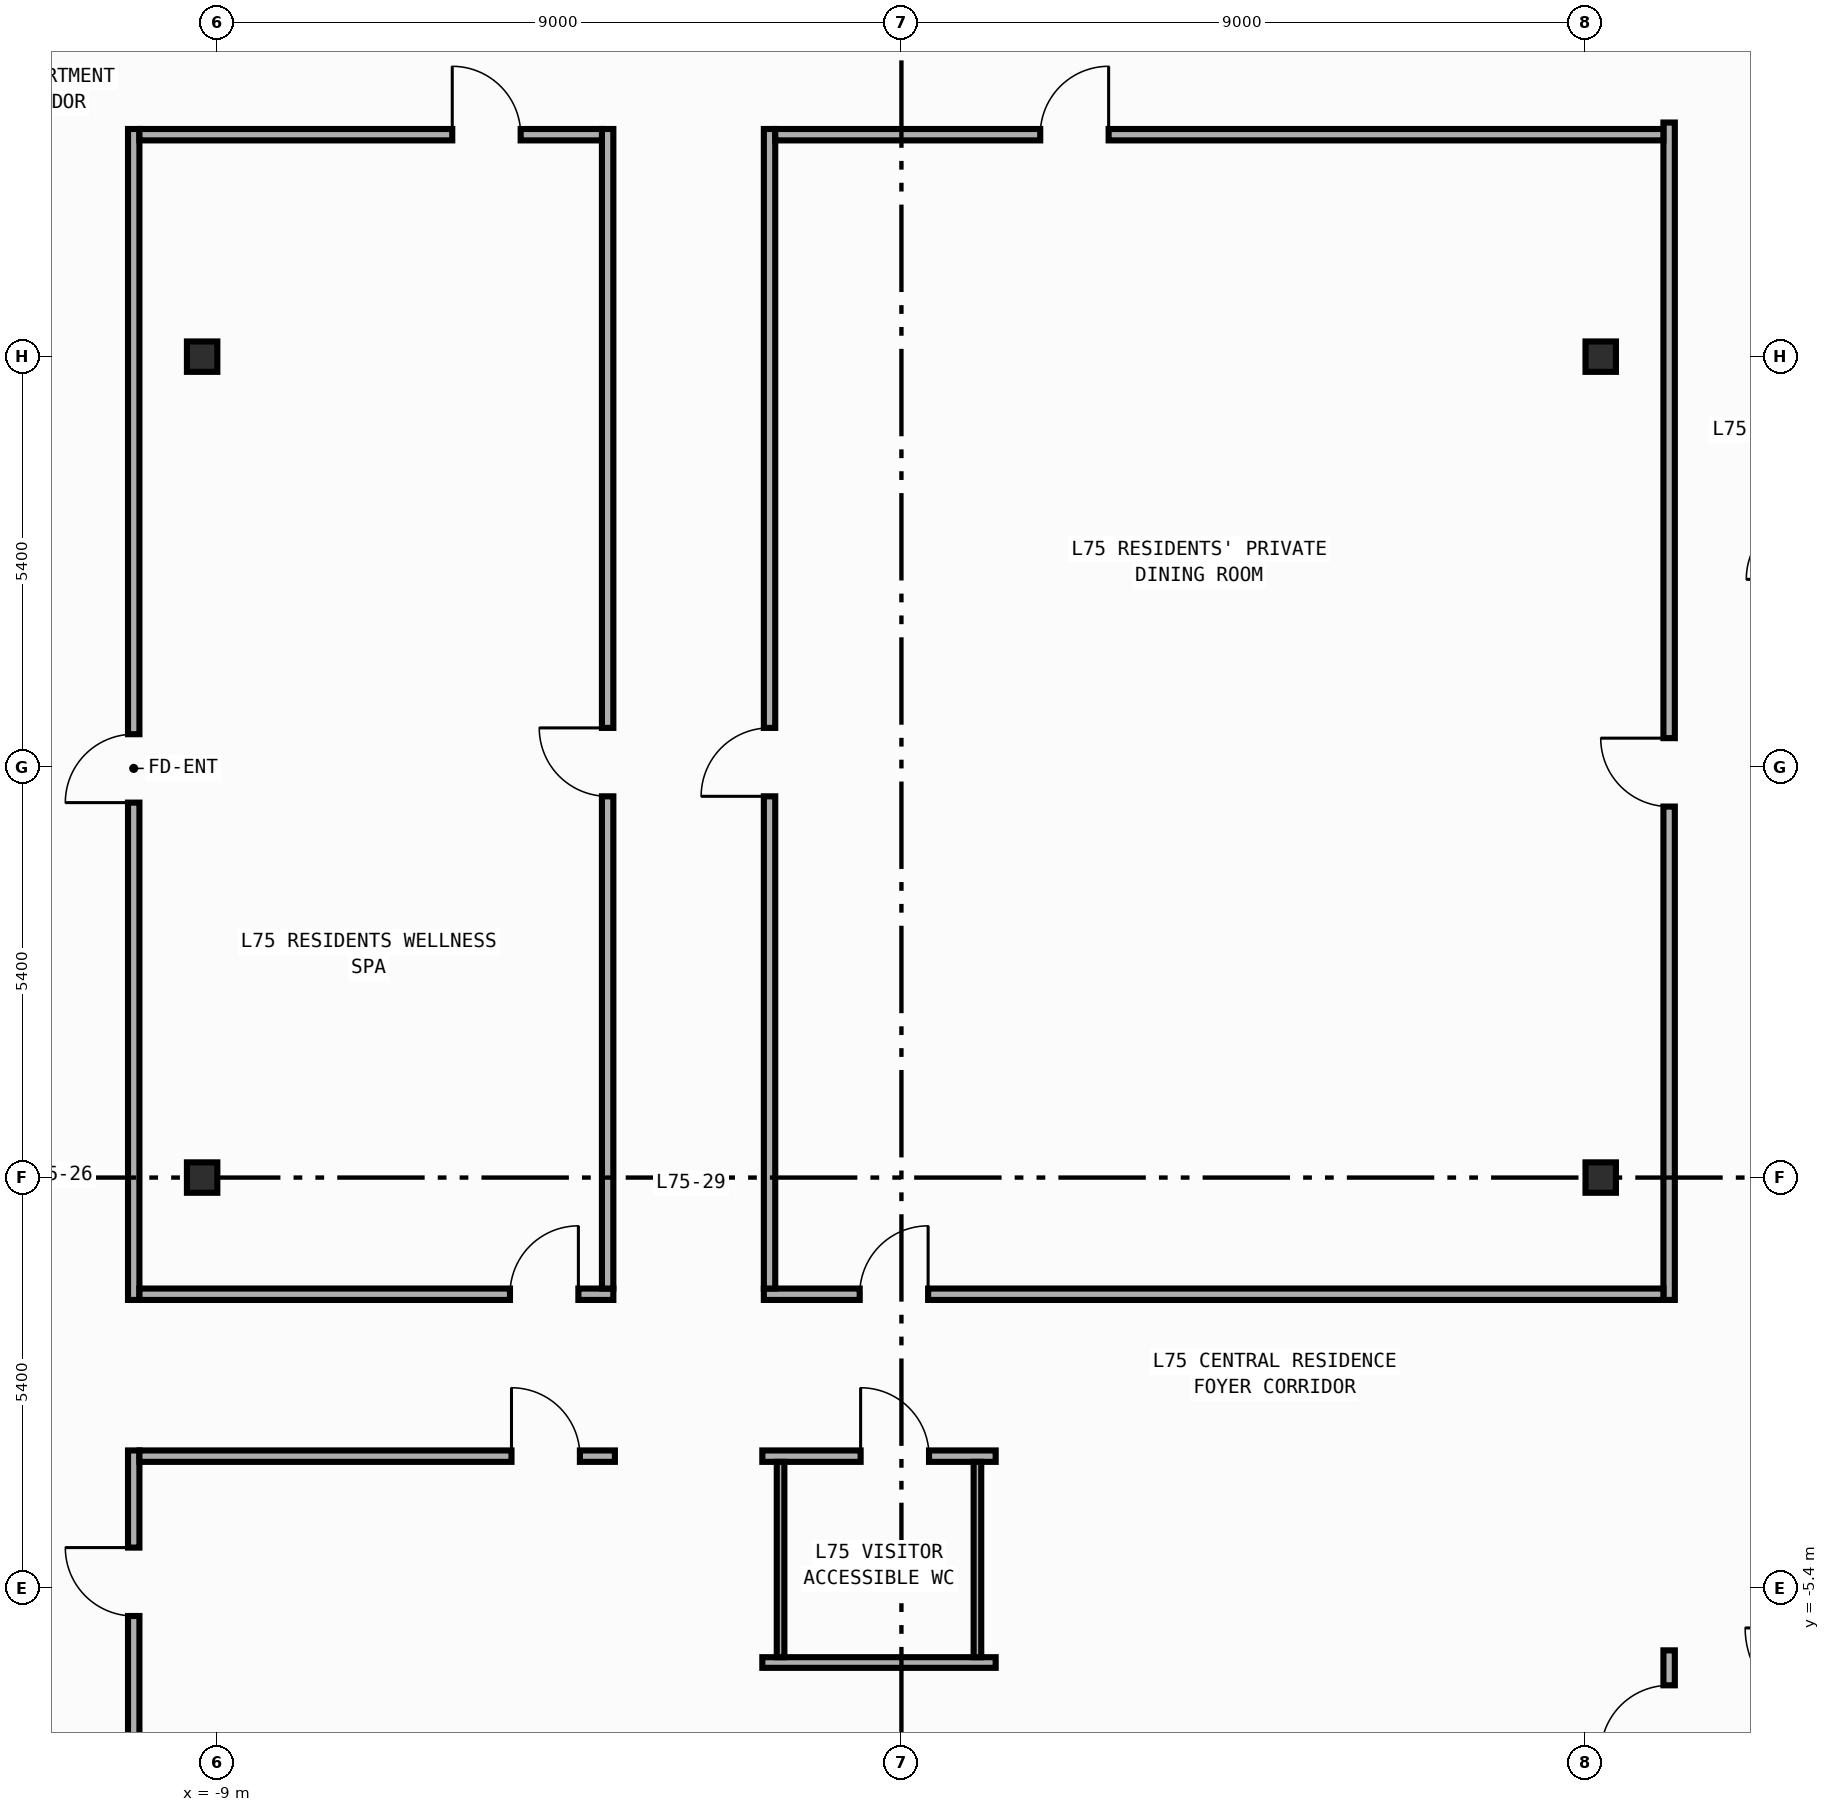
"""IFC4 building model, lengths in metres.
Left out: names, types, materials, properties, quantities, classifications, styles, units other than length and angle.
Written with IfcOpenShell. Run it as: python <this file> out.ifc"""

import sys

from ifc_helpers import new_model, si_unit, direction, frame, frame_2d, origin, origin_2d, place, context, subcontext, project, spatial, rectangle, i_section, extrude, element, fill, save


model = new_model("IFC4")
c1 = context("Model", 3, precision=1e-05, world=origin(), true_north=direction((0.0, 1.0)))
c2 = subcontext(c1, "Body", "Model", "MODEL_VIEW")
j1 = project(units=[si_unit("LENGTHUNIT", "METRE"), si_unit("PLANEANGLEUNIT", "RADIAN")], contexts=[c1])
p1 = place(None, origin())
s1 = spatial("IfcSite", under=j1, at=p1, CompositionType="ELEMENT")
p2 = place(p1, origin())
s2 = spatial("IfcBuilding", under=s1, at=p2, CompositionType="ELEMENT")
p3 = place(p2, frame((0.0, 0.0, 311.8)))
s3 = spatial("IfcBuildingStorey", under=s2, at=p3, CompositionType="ELEMENT", Elevation=311.8)
for number, where, z_axis, x_axis in (
    (1, (-9.2, 0.0, 0.0), (0.0, 0.0, 1.0), (1.0, 0.0, 0.0)),
    (2, (-9.2, 10.8, 0.0), (0.0, 0.0, 1.0), (1.0, 0.0, 0.0)),
    (3, (9.2, 0.0, 0.0), (0.0, 0.0, 1.0), (1.0, 0.0, 0.0)),
    (4, (9.2, 10.8, 0.0), (0.0, 0.0, 1.0), (1.0, 0.0, 0.0)),
):
    element("IfcColumn", number, at=place(p3, frame(where, z_axis=z_axis, x_axis=x_axis)), inside=s3, PredefinedType="COLUMN", context=c2, shape_type="SweptSolid", body=[
        extrude(i_section(OverallWidth=0.4, OverallDepth=0.4, WebThickness=0.013, FlangeThickness=0.021, FilletRadius=0.022, at=origin_2d()), origin(), (0.0, 0.0, 1.0), 3.8),
    ])
p4 = place(p3, frame((-10.1, -1.61, 0.0), z_axis=(0.0, 0.0, 1.0), x_axis=(0.0, 1.0, 0.0)))
e5 = element("IfcWall", 5, at=p4, inside=s3, PredefinedType="PARTITIONING", context=c2, shape_type="SweptSolid", body=[
    extrude(rectangle(XDim=15.405, YDim=0.15, at=frame_2d((7.703, 0.0))), origin(), (0.0, 0.0, 1.0), 3.54),
])
p5 = place(p4, frame((6.543, 0.0, 0.0)))
e6 = element("IfcOpeningElement", 6, at=p5, cuts=e5, PredefinedType="OPENING", context=c2, shape_type="SweptSolid", body=[
    extrude(rectangle(XDim=0.9, YDim=2.15, at=frame_2d((0.45, 1.075))), frame((0.0, 0.085, 0.0), z_axis=(0.0, -1.0, 0.0), x_axis=(1.0, 0.0, 0.0)), (0.0, 0.0, 1.0), 0.17),
])
p6 = place(p3, frame((-10.1, -13.795, 0.0), z_axis=(0.0, 0.0, 1.0), x_axis=(0.0, 1.0, 0.0)))
e7 = element("IfcWall", 7, at=p6, inside=s3, PredefinedType="PARTITIONING", context=c2, shape_type="SweptSolid", body=[
    extrude(rectangle(XDim=10.205, YDim=0.15, at=frame_2d((5.103, 0.0))), origin(), (0.0, 0.0, 1.0), 3.54),
])
p7 = place(p6, frame((8.027, 0.0, 0.0)))
e8 = element("IfcOpeningElement", 8, at=p7, cuts=e7, PredefinedType="OPENING", context=c2, shape_type="SweptSolid", body=[
    extrude(rectangle(XDim=0.9, YDim=2.15, at=frame_2d((0.45, 1.075))), frame((0.0, 0.085, 0.0), z_axis=(0.0, -1.0, 0.0), x_axis=(1.0, 0.0, 0.0)), (0.0, 0.0, 1.0), 0.17),
])
p8 = place(p3, frame((10.1, -1.61, 0.0), z_axis=(0.0, 0.0, 1.0), x_axis=(0.0, 1.0, 0.0)))
e9 = element("IfcWall", 9, at=p8, inside=s3, PredefinedType="PARTITIONING", context=c2, shape_type="SweptSolid", body=[
    extrude(rectangle(XDim=15.49, YDim=0.15, at=frame_2d((7.745, 0.0))), origin(), (0.0, 0.0, 1.0), 3.54),
])
p9 = place(p8, frame((6.491, 0.0, 0.0)))
e10 = element("IfcOpeningElement", 10, at=p9, cuts=e9, PredefinedType="OPENING", context=c2, shape_type="SweptSolid", body=[
    extrude(rectangle(XDim=0.9, YDim=2.15, at=frame_2d((0.45, 1.075))), frame((0.0, 0.085, 0.0), z_axis=(0.0, -1.0, 0.0), x_axis=(1.0, 0.0, 0.0)), (0.0, 0.0, 1.0), 0.17),
])
p10 = place(p3, frame((10.1, -13.795, 0.0), z_axis=(0.0, 0.0, 1.0), x_axis=(0.0, 1.0, 0.0)))
e11 = element("IfcWall", 11, at=p10, inside=s3, PredefinedType="PARTITIONING", context=c2, shape_type="SweptSolid", body=[
    extrude(rectangle(XDim=7.575, YDim=0.15, at=frame_2d((3.788, 0.0))), origin(), (0.0, 0.0, 1.0), 3.54),
])
p11 = place(p10, frame((6.215, 0.0, 0.0)))
e12 = element("IfcOpeningElement", 12, at=p11, cuts=e11, PredefinedType="OPENING", context=c2, shape_type="SweptSolid", body=[
    extrude(rectangle(XDim=0.9, YDim=2.15, at=frame_2d((0.45, 1.075))), frame((0.0, 0.085, 0.0), z_axis=(0.0, -1.0, 0.0), x_axis=(1.0, 0.0, 0.0)), (0.0, 0.0, 1.0), 0.17),
])
p12 = place(p3, frame((-10.025, -1.535, 0.0), z_axis=(0.0, 0.0, 1.0), x_axis=(1.0, 0.0, 0.0)))
e13 = element("IfcWall", 13, at=p12, inside=s3, PredefinedType="PARTITIONING", context=c2, shape_type="SweptSolid", body=[
    extrude(rectangle(XDim=6.235, YDim=0.15, at=frame_2d((3.117, 0.0))), origin(), (0.0, 0.0, 1.0), 3.54),
])
p13 = place(p12, frame((4.875, 0.0, 0.0)))
e14 = element("IfcOpeningElement", 14, at=p13, cuts=e13, PredefinedType="OPENING", context=c2, shape_type="SweptSolid", body=[
    extrude(rectangle(XDim=0.9, YDim=2.15, at=frame_2d((0.45, 1.075))), frame((0.0, 0.085, 0.0), z_axis=(0.0, -1.0, 0.0), x_axis=(1.0, 0.0, 0.0)), (0.0, 0.0, 1.0), 0.17),
])
p14 = place(p3, frame((-10.025, -3.665, 0.0), z_axis=(0.0, 0.0, 1.0), x_axis=(1.0, 0.0, 0.0)))
e15 = element("IfcWall", 15, at=p14, inside=s3, PredefinedType="PARTITIONING", context=c2, shape_type="SweptSolid", body=[
    extrude(rectangle(XDim=6.255, YDim=0.15, at=frame_2d((3.127, 0.0))), origin(), (0.0, 0.0, 1.0), 3.54),
])
p15 = place(p14, frame((4.895, 0.0, 0.0)))
e16 = element("IfcOpeningElement", 16, at=p15, cuts=e15, PredefinedType="OPENING", context=c2, shape_type="SweptSolid", body=[
    extrude(rectangle(XDim=0.9, YDim=2.15, at=frame_2d((0.45, 1.075))), frame((0.0, 0.085, 0.0), z_axis=(0.0, -1.0, 0.0), x_axis=(1.0, 0.0, 0.0)), (0.0, 0.0, 1.0), 0.17),
])
p16 = place(p3, frame((-1.81, -1.535, 0.0), z_axis=(0.0, 0.0, 1.0), x_axis=(1.0, 0.0, 0.0)))
e17 = element("IfcWall", 17, at=p16, inside=s3, PredefinedType="PARTITIONING", context=c2, shape_type="SweptSolid", body=[
    extrude(rectangle(XDim=11.835, YDim=0.15, at=frame_2d((5.917, 0.0))), origin(), (0.0, 0.0, 1.0), 3.54),
])
p17 = place(p16, frame((1.261, 0.0, 0.0)))
e18 = element("IfcOpeningElement", 18, at=p17, cuts=e17, PredefinedType="OPENING", context=c2, shape_type="SweptSolid", body=[
    extrude(rectangle(XDim=0.9, YDim=2.15, at=frame_2d((0.45, 1.075))), frame((0.0, 0.085, 0.0), z_axis=(0.0, -1.0, 0.0), x_axis=(1.0, 0.0, 0.0)), (0.0, 0.0, 1.0), 0.17),
])
p18 = place(p3, frame((-1.83, -3.665, 0.0), z_axis=(0.0, 0.0, 1.0), x_axis=(1.0, 0.0, 0.0)))
e19 = element("IfcWall", 19, at=p18, inside=s3, PredefinedType="PARTITIONING", context=c2, shape_type="SweptSolid", body=[
    extrude(rectangle(XDim=3.07, YDim=0.15, at=frame_2d((1.535, 0.0))), origin(), (0.0, 0.0, 1.0), 3.54),
])
p19 = place(p18, frame((1.293, 0.0, 0.0)))
e20 = element("IfcOpeningElement", 20, at=p19, cuts=e19, PredefinedType="OPENING", context=c2, shape_type="SweptSolid", body=[
    extrude(rectangle(XDim=0.9, YDim=2.15, at=frame_2d((0.45, 1.075))), frame((0.0, 0.085, 0.0), z_axis=(0.0, -1.0, 0.0), x_axis=(1.0, 0.0, 0.0)), (0.0, 0.0, 1.0), 0.17),
])
p20 = place(p3, frame((-3.865, -1.46, 0.0), z_axis=(0.0, 0.0, 1.0), x_axis=(0.0, 1.0, 0.0)))
e21 = element("IfcWall", 21, at=p20, inside=s3, PredefinedType="PARTITIONING", context=c2, shape_type="SweptSolid", body=[
    extrude(rectangle(XDim=15.255, YDim=0.15, at=frame_2d((7.627, 0.0))), origin(), (0.0, 0.0, 1.0), 3.54),
])
p21 = place(p20, frame((6.476, 0.0, 0.0)))
e22 = element("IfcOpeningElement", 22, at=p21, cuts=e21, PredefinedType="OPENING", context=c2, shape_type="SweptSolid", body=[
    extrude(rectangle(XDim=0.9, YDim=2.15, at=frame_2d((0.45, 1.075))), frame((0.0, 0.085, 0.0), z_axis=(0.0, -1.0, 0.0), x_axis=(1.0, 0.0, 0.0)), (0.0, 0.0, 1.0), 0.17),
])
p22 = place(p3, frame((-1.735, -1.46, 0.0), z_axis=(0.0, 0.0, 1.0), x_axis=(0.0, 1.0, 0.0)))
e23 = element("IfcWall", 23, at=p22, inside=s3, PredefinedType="PARTITIONING", context=c2, shape_type="SweptSolid", body=[
    extrude(rectangle(XDim=15.255, YDim=0.15, at=frame_2d((7.627, 0.0))), origin(), (0.0, 0.0, 1.0), 3.54),
])
p23 = place(p22, frame((6.476, 0.0, 0.0)))
e24 = element("IfcOpeningElement", 24, at=p23, cuts=e23, PredefinedType="OPENING", context=c2, shape_type="SweptSolid", body=[
    extrude(rectangle(XDim=0.9, YDim=2.15, at=frame_2d((0.45, 1.075))), frame((0.0, 0.085, 0.0), z_axis=(0.0, -1.0, 0.0), x_axis=(1.0, 0.0, 0.0)), (0.0, 0.0, 1.0), 0.17),
])
p24 = place(p3, frame((-10.025, 13.72, 0.0), z_axis=(0.0, 0.0, 1.0), x_axis=(1.0, 0.0, 0.0)))
e25 = element("IfcWall", 25, at=p24, inside=s3, PredefinedType="PARTITIONING", context=c2, shape_type="SweptSolid", body=[
    extrude(rectangle(XDim=6.085, YDim=0.15, at=frame_2d((3.042, 0.0))), origin(), (0.0, 0.0, 1.0), 3.54),
])
p25 = place(p24, frame((4.116, 0.0, 0.0)))
e26 = element("IfcOpeningElement", 26, at=p25, cuts=e25, PredefinedType="OPENING", context=c2, shape_type="SweptSolid", body=[
    extrude(rectangle(XDim=0.9, YDim=2.15, at=frame_2d((0.45, 1.075))), frame((0.0, 0.085, 0.0), z_axis=(0.0, -1.0, 0.0), x_axis=(1.0, 0.0, 0.0)), (0.0, 0.0, 1.0), 0.17),
])
p26 = place(p3, frame((-1.66, 13.72, 0.0), z_axis=(0.0, 0.0, 1.0), x_axis=(1.0, 0.0, 0.0)))
e27 = element("IfcWall", 27, at=p26, inside=s3, PredefinedType="PARTITIONING", context=c2, shape_type="SweptSolid", body=[
    extrude(rectangle(XDim=11.685, YDim=0.15, at=frame_2d((5.842, 0.0))), origin(), (0.0, 0.0, 1.0), 3.54),
])
p27 = place(p26, frame((3.486, 0.0, 0.0)))
e28 = element("IfcOpeningElement", 28, at=p27, cuts=e27, PredefinedType="OPENING", context=c2, shape_type="SweptSolid", body=[
    extrude(rectangle(XDim=0.9, YDim=2.15, at=frame_2d((0.45, 1.075))), frame((0.0, 0.085, 0.0), z_axis=(0.0, -1.0, 0.0), x_axis=(1.0, 0.0, 0.0)), (0.0, 0.0, 1.0), 0.17),
])
p28 = place(p3, frame((-1.83, -6.38, 0.0), z_axis=(0.0, 0.0, 1.0), x_axis=(1.0, 0.0, 0.0)))
e29 = element("IfcWall", 29, at=p28, inside=s3, PredefinedType="PARTITIONING", context=c2, shape_type="SweptSolid", body=[
    extrude(rectangle(XDim=3.07, YDim=0.14, at=frame_2d((1.535, 0.0))), origin(), (0.0, 0.0, 1.0), 3.54),
])
for number, where, z_axis, x_axis in (
    (30, (1.0, -3.74, 0.0), (0.0, 0.0, 1.0), (0.0, -1.0, 0.0)),
    (31, (-1.59, -6.31, 0.0), (0.0, 0.0, 1.0), (0.0, 1.0, 0.0)),
):
    element("IfcWall", number, at=place(p3, frame(where, z_axis=z_axis, x_axis=x_axis)), inside=s3, PredefinedType="PARTITIONING", context=c2, shape_type="SweptSolid", body=[
        extrude(rectangle(XDim=2.57, YDim=0.1, at=frame_2d((1.285, 0.0))), origin(), (0.0, 0.0, 1.0), 3.54),
    ])
p29 = place(p5, origin())
e32 = element("IfcDoor", 32, at=p29, inside=s3, OperationType="SINGLE_SWING_LEFT", PredefinedType="DOOR", context=c2, shape_type="SweptSolid", body=[
    extrude(rectangle(XDim=0.9, YDim=2.15, at=frame_2d((0.45, 1.075))), frame((0.0, 0.025, 0.0), z_axis=(0.0, -1.0, 0.0), x_axis=(1.0, 0.0, 0.0)), (0.0, 0.0, 1.0), 0.05),
])
fill(e6, e32)
p30 = place(p7, origin())
e33 = element("IfcDoor", 33, at=p30, inside=s3, OperationType="SINGLE_SWING_RIGHT", PredefinedType="DOOR", context=c2, shape_type="SweptSolid", body=[
    extrude(rectangle(XDim=0.9, YDim=2.15, at=frame_2d((0.45, 1.075))), frame((0.0, 0.025, 0.0), z_axis=(0.0, -1.0, 0.0), x_axis=(1.0, 0.0, 0.0)), (0.0, 0.0, 1.0), 0.05),
])
fill(e8, e33)
p31 = place(p9, origin())
e34 = element("IfcDoor", 34, at=p31, inside=s3, OperationType="SINGLE_SWING_RIGHT", PredefinedType="DOOR", context=c2, shape_type="SweptSolid", body=[
    extrude(rectangle(XDim=0.9, YDim=2.15, at=frame_2d((0.45, 1.075))), frame((0.0, 0.025, 0.0), z_axis=(0.0, -1.0, 0.0), x_axis=(1.0, 0.0, 0.0)), (0.0, 0.0, 1.0), 0.05),
])
fill(e10, e34)
p32 = place(p11, origin())
e35 = element("IfcDoor", 35, at=p32, inside=s3, OperationType="SINGLE_SWING_LEFT", PredefinedType="DOOR", context=c2, shape_type="SweptSolid", body=[
    extrude(rectangle(XDim=0.9, YDim=2.15, at=frame_2d((0.45, 1.075))), frame((0.0, 0.025, 0.0), z_axis=(0.0, -1.0, 0.0), x_axis=(1.0, 0.0, 0.0)), (0.0, 0.0, 1.0), 0.05),
])
fill(e12, e35)
p33 = place(p13, origin())
e36 = element("IfcDoor", 36, at=p33, inside=s3, OperationType="SINGLE_SWING_RIGHT", PredefinedType="DOOR", context=c2, shape_type="SweptSolid", body=[
    extrude(rectangle(XDim=0.9, YDim=2.15, at=frame_2d((0.45, 1.075))), frame((0.0, 0.025, 0.0), z_axis=(0.0, -1.0, 0.0), x_axis=(1.0, 0.0, 0.0)), (0.0, 0.0, 1.0), 0.05),
])
fill(e14, e36)
p34 = place(p15, origin())
e37 = element("IfcDoor", 37, at=p34, inside=s3, OperationType="SINGLE_SWING_LEFT", PredefinedType="DOOR", context=c2, shape_type="SweptSolid", body=[
    extrude(rectangle(XDim=0.9, YDim=2.15, at=frame_2d((0.45, 1.075))), frame((0.0, 0.025, 0.0), z_axis=(0.0, -1.0, 0.0), x_axis=(1.0, 0.0, 0.0)), (0.0, 0.0, 1.0), 0.05),
])
fill(e16, e37)
p35 = place(p17, origin())
e38 = element("IfcDoor", 38, at=p35, inside=s3, OperationType="SINGLE_SWING_RIGHT", PredefinedType="DOOR", context=c2, shape_type="SweptSolid", body=[
    extrude(rectangle(XDim=0.9, YDim=2.15, at=frame_2d((0.45, 1.075))), frame((0.0, 0.025, 0.0), z_axis=(0.0, -1.0, 0.0), x_axis=(1.0, 0.0, 0.0)), (0.0, 0.0, 1.0), 0.05),
])
fill(e18, e38)
p36 = place(p19, origin())
e39 = element("IfcDoor", 39, at=p36, inside=s3, OperationType="SINGLE_SWING_LEFT", PredefinedType="DOOR", context=c2, shape_type="SweptSolid", body=[
    extrude(rectangle(XDim=0.9, YDim=2.15, at=frame_2d((0.45, 1.075))), frame((0.0, 0.025, 0.0), z_axis=(0.0, -1.0, 0.0), x_axis=(1.0, 0.0, 0.0)), (0.0, 0.0, 1.0), 0.05),
])
fill(e20, e39)
p37 = place(p21, origin())
e40 = element("IfcDoor", 40, at=p37, inside=s3, OperationType="SINGLE_SWING_RIGHT", PredefinedType="DOOR", context=c2, shape_type="SweptSolid", body=[
    extrude(rectangle(XDim=0.9, YDim=2.15, at=frame_2d((0.45, 1.075))), frame((0.0, 0.025, 0.0), z_axis=(0.0, -1.0, 0.0), x_axis=(1.0, 0.0, 0.0)), (0.0, 0.0, 1.0), 0.05),
])
fill(e22, e40)
p38 = place(p23, origin())
e41 = element("IfcDoor", 41, at=p38, inside=s3, OperationType="SINGLE_SWING_LEFT", PredefinedType="DOOR", context=c2, shape_type="SweptSolid", body=[
    extrude(rectangle(XDim=0.9, YDim=2.15, at=frame_2d((0.45, 1.075))), frame((0.0, 0.025, 0.0), z_axis=(0.0, -1.0, 0.0), x_axis=(1.0, 0.0, 0.0)), (0.0, 0.0, 1.0), 0.05),
])
fill(e24, e41)
p39 = place(p25, origin())
e42 = element("IfcDoor", 42, at=p39, inside=s3, OperationType="SINGLE_SWING_LEFT", PredefinedType="DOOR", context=c2, shape_type="SweptSolid", body=[
    extrude(rectangle(XDim=0.9, YDim=2.15, at=frame_2d((0.45, 1.075))), frame((0.0, 0.025, 0.0), z_axis=(0.0, -1.0, 0.0), x_axis=(1.0, 0.0, 0.0)), (0.0, 0.0, 1.0), 0.05),
])
fill(e26, e42)
p40 = place(p27, origin())
e43 = element("IfcDoor", 43, at=p40, inside=s3, OperationType="SINGLE_SWING_RIGHT", PredefinedType="DOOR", context=c2, shape_type="SweptSolid", body=[
    extrude(rectangle(XDim=0.9, YDim=2.15, at=frame_2d((0.45, 1.075))), frame((0.0, 0.025, 0.0), z_axis=(0.0, -1.0, 0.0), x_axis=(1.0, 0.0, 0.0)), (0.0, 0.0, 1.0), 0.05),
])
fill(e28, e43)
save(model, sys.argv[1])
